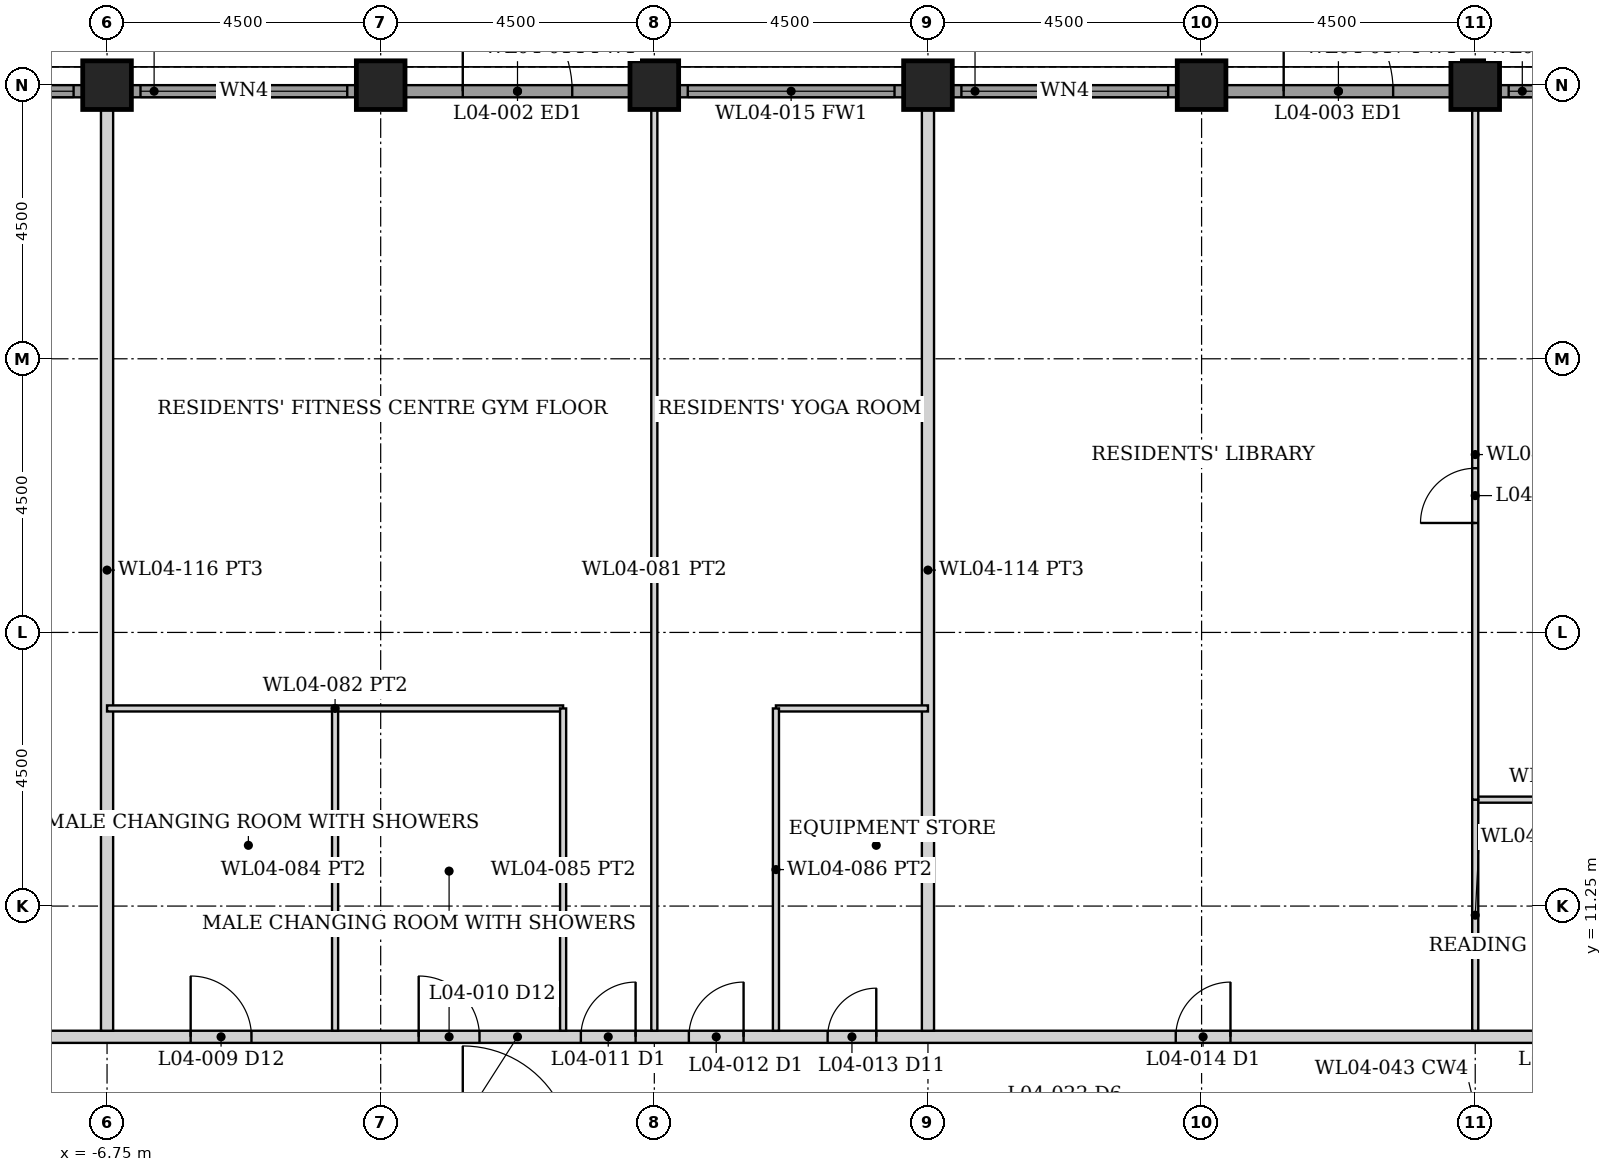
"""IFC4 building model, lengths in metres.
Left out: names, types, materials, properties, quantities, classifications, styles, units other than length and angle.
Written with IfcOpenShell. Run it as: python <this file> out.ifc"""

import sys

from ifc_helpers import new_model, si_unit, direction, frame, frame_2d, origin, origin_2d, place, context, subcontext, project, spatial, rectangle, hollow_rectangle, extrude, element, fill, save


model = new_model("IFC4")
c1 = context("Model", 3, precision=1e-05, world=origin(), true_north=direction((0.0, 1.0)))
c2 = subcontext(c1, "Body", "Model", "MODEL_VIEW")
j1 = project(units=[si_unit("LENGTHUNIT", "METRE"), si_unit("PLANEANGLEUNIT", "RADIAN")], contexts=[c1])
p1 = place(None, origin())
s1 = spatial("IfcSite", under=j1, at=p1, CompositionType="ELEMENT")
p2 = place(p1, origin())
s2 = spatial("IfcBuilding", under=s1, at=p2, CompositionType="ELEMENT")
p3 = place(p2, frame((0.0, 0.0, 21.5)))
s3 = spatial("IfcBuildingStorey", under=s2, at=p3, CompositionType="ELEMENT", Elevation=21.5)
for number, where, z_axis, x_axis in (
    (1, (-6.75, 24.75, 0.0), (0.0, 0.0, 1.0), (0.0, 1.0, 0.0)),
    (2, (-2.25, 24.75, 0.0), (0.0, 0.0, 1.0), (0.0, 1.0, 0.0)),
    (3, (2.25, 24.75, 0.0), (0.0, 0.0, 1.0), (0.0, 1.0, 0.0)),
    (4, (6.75, 24.75, 0.0), (0.0, 0.0, 1.0), (0.0, 1.0, 0.0)),
    (5, (11.25, 24.75, 0.0), (0.0, 0.0, 1.0), (0.0, 1.0, 0.0)),
    (6, (15.75, 24.75, 0.0), (0.0, 0.0, 1.0), (0.0, 1.0, 0.0)),
):
    element("IfcColumn", number, at=place(p3, frame(where, z_axis=z_axis, x_axis=x_axis)), inside=s3, PredefinedType="COLUMN", context=c2, shape_type="SweptSolid", body=[
        extrude(hollow_rectangle(XDim=0.8, YDim=0.8, WallThickness=0.08, at=origin_2d()), origin(), (0.0, 0.0, 1.0), 5.0),
    ])
p4 = place(p3, frame((-10.845, 24.65, 0.0), z_axis=(0.0, 0.0, 1.0), x_axis=(1.0, 0.0, 0.0)))
e7 = element("IfcWall", 7, at=p4, inside=s3, PredefinedType="SOLIDWALL", context=c2, shape_type="SweptSolid", body=[
    extrude(rectangle(XDim=3.69, YDim=0.2, at=frame_2d((1.845, 0.0))), origin(), (0.0, 0.0, 1.0), 3.879),
])
p5 = place(p4, frame((0.145, 0.0, 0.3)))
e8 = element("IfcOpeningElement", 8, at=p5, cuts=e7, PredefinedType="OPENING", context=c2, shape_type="SweptSolid", body=[
    extrude(rectangle(XDim=3.4, YDim=3.429, at=frame_2d((1.7, 1.714))), frame((0.0, 0.11, 0.0), z_axis=(0.0, -1.0, 0.0), x_axis=(1.0, 0.0, 0.0)), (0.0, 0.0, 1.0), 0.22),
])
p6 = place(p3, frame((-6.345, 24.65, 0.0), z_axis=(0.0, 0.0, 1.0), x_axis=(1.0, 0.0, 0.0)))
e9 = element("IfcWall", 9, at=p6, inside=s3, PredefinedType="SOLIDWALL", context=c2, shape_type="SweptSolid", body=[
    extrude(rectangle(XDim=3.69, YDim=0.2, at=frame_2d((1.845, 0.0))), origin(), (0.0, 0.0, 1.0), 3.879),
])
p7 = place(p6, frame((0.145, 0.0, 0.3)))
e10 = element("IfcOpeningElement", 10, at=p7, cuts=e9, PredefinedType="OPENING", context=c2, shape_type="SweptSolid", body=[
    extrude(rectangle(XDim=3.4, YDim=3.429, at=frame_2d((1.7, 1.714))), frame((0.0, 0.11, 0.0), z_axis=(0.0, -1.0, 0.0), x_axis=(1.0, 0.0, 0.0)), (0.0, 0.0, 1.0), 0.22),
])
p8 = place(p3, frame((-1.845, 24.65, 0.0), z_axis=(0.0, 0.0, 1.0), x_axis=(1.0, 0.0, 0.0)))
e11 = element("IfcWall", 11, at=p8, inside=s3, PredefinedType="SOLIDWALL", context=c2, shape_type="SweptSolid", body=[
    extrude(rectangle(XDim=3.69, YDim=0.2, at=frame_2d((1.845, 0.0))), origin(), (0.0, 0.0, 1.0), 3.879),
])
p9 = place(p8, frame((0.945, 0.0, 0.0)))
e12 = element("IfcOpeningElement", 12, at=p9, cuts=e11, PredefinedType="OPENING", context=c2, shape_type="SweptSolid", body=[
    extrude(rectangle(XDim=1.8, YDim=2.4, at=frame_2d((0.9, 1.2))), frame((0.0, 0.11, 0.0), z_axis=(0.0, -1.0, 0.0), x_axis=(1.0, 0.0, 0.0)), (0.0, 0.0, 1.0), 0.22),
])
p10 = place(p3, frame((2.655, 24.65, 0.0), z_axis=(0.0, 0.0, 1.0), x_axis=(1.0, 0.0, 0.0)))
e13 = element("IfcWall", 13, at=p10, inside=s3, PredefinedType="SOLIDWALL", context=c2, shape_type="SweptSolid", body=[
    extrude(rectangle(XDim=3.69, YDim=0.2, at=frame_2d((1.845, 0.0))), origin(), (0.0, 0.0, 1.0), 3.879),
])
p11 = place(p10, frame((0.145, 0.0, 0.3)))
e14 = element("IfcOpeningElement", 14, at=p11, cuts=e13, PredefinedType="OPENING", context=c2, shape_type="SweptSolid", body=[
    extrude(rectangle(XDim=3.4, YDim=3.429, at=frame_2d((1.7, 1.714))), frame((0.0, 0.11, 0.0), z_axis=(0.0, -1.0, 0.0), x_axis=(1.0, 0.0, 0.0)), (0.0, 0.0, 1.0), 0.22),
])
p12 = place(p3, frame((7.155, 24.65, 0.0), z_axis=(0.0, 0.0, 1.0), x_axis=(1.0, 0.0, 0.0)))
e15 = element("IfcWall", 15, at=p12, inside=s3, PredefinedType="SOLIDWALL", context=c2, shape_type="SweptSolid", body=[
    extrude(rectangle(XDim=3.69, YDim=0.2, at=frame_2d((1.845, 0.0))), origin(), (0.0, 0.0, 1.0), 3.879),
])
p13 = place(p12, frame((0.145, 0.0, 0.3)))
e16 = element("IfcOpeningElement", 16, at=p13, cuts=e15, PredefinedType="OPENING", context=c2, shape_type="SweptSolid", body=[
    extrude(rectangle(XDim=3.4, YDim=3.429, at=frame_2d((1.7, 1.714))), frame((0.0, 0.11, 0.0), z_axis=(0.0, -1.0, 0.0), x_axis=(1.0, 0.0, 0.0)), (0.0, 0.0, 1.0), 0.22),
])
p14 = place(p3, frame((11.655, 24.65, 0.0), z_axis=(0.0, 0.0, 1.0), x_axis=(1.0, 0.0, 0.0)))
e17 = element("IfcWall", 17, at=p14, inside=s3, PredefinedType="SOLIDWALL", context=c2, shape_type="SweptSolid", body=[
    extrude(rectangle(XDim=3.69, YDim=0.2, at=frame_2d((1.845, 0.0))), origin(), (0.0, 0.0, 1.0), 3.879),
])
p15 = place(p14, frame((0.945, 0.0, 0.0)))
e18 = element("IfcOpeningElement", 18, at=p15, cuts=e17, PredefinedType="OPENING", context=c2, shape_type="SweptSolid", body=[
    extrude(rectangle(XDim=1.8, YDim=2.4, at=frame_2d((0.9, 1.2))), frame((0.0, 0.11, 0.0), z_axis=(0.0, -1.0, 0.0), x_axis=(1.0, 0.0, 0.0)), (0.0, 0.0, 1.0), 0.22),
])
p16 = place(p3, frame((16.155, 24.65, 0.0), z_axis=(0.0, 0.0, 1.0), x_axis=(1.0, 0.0, 0.0)))
e19 = element("IfcWall", 19, at=p16, inside=s3, PredefinedType="SOLIDWALL", context=c2, shape_type="SweptSolid", body=[
    extrude(rectangle(XDim=3.69, YDim=0.2, at=frame_2d((1.845, 0.0))), origin(), (0.0, 0.0, 1.0), 3.879),
])
p17 = place(p16, frame((0.145, 0.0, 0.3)))
e20 = element("IfcOpeningElement", 20, at=p17, cuts=e19, PredefinedType="OPENING", context=c2, shape_type="SweptSolid", body=[
    extrude(rectangle(XDim=3.4, YDim=3.429, at=frame_2d((1.7, 1.714))), frame((0.0, 0.11, 0.0), z_axis=(0.0, -1.0, 0.0), x_axis=(1.0, 0.0, 0.0)), (0.0, 0.0, 1.0), 0.22),
])
p18 = place(p3, frame((-24.55, 9.1, 0.0), z_axis=(0.0, 0.0, 1.0), x_axis=(1.0, 0.0, 0.0)))
e21 = element("IfcWall", 21, at=p18, inside=s3, PredefinedType="PARTITIONING", context=c2, shape_type="SweptSolid", body=[
    extrude(rectangle(XDim=49.1, YDim=0.2, at=frame_2d((24.55, 0.0))), origin(), (0.0, 0.0, 1.0), 3.873),
])
p19 = place(p18, frame((6.684, 0.0, 0.0)))
e22 = element("IfcOpeningElement", 22, at=p19, cuts=e21, PredefinedType="OPENING", context=c2, shape_type="SweptSolid", body=[
    extrude(rectangle(XDim=0.9, YDim=2.1, at=frame_2d((0.45, 1.05))), frame((0.0, 0.11, 0.0), z_axis=(0.0, -1.0, 0.0), x_axis=(1.0, 0.0, 0.0)), (0.0, 0.0, 1.0), 0.22),
])
p20 = place(p18, frame((14.06, 0.0, 0.0)))
e23 = element("IfcOpeningElement", 23, at=p20, cuts=e21, PredefinedType="OPENING", context=c2, shape_type="SweptSolid", body=[
    extrude(rectangle(XDim=0.9, YDim=2.1, at=frame_2d((0.45, 1.05))), frame((0.0, 0.11, 0.0), z_axis=(0.0, -1.0, 0.0), x_axis=(1.0, 0.0, 0.0)), (0.0, 0.0, 1.0), 0.22),
])
p21 = place(p18, frame((9.65, 0.0, 0.0)))
e24 = element("IfcOpeningElement", 24, at=p21, cuts=e21, PredefinedType="OPENING", context=c2, shape_type="SweptSolid", body=[
    extrude(rectangle(XDim=0.8, YDim=2.1, at=frame_2d((0.4, 1.05))), frame((0.0, 0.11, 0.0), z_axis=(0.0, -1.0, 0.0), x_axis=(1.0, 0.0, 0.0)), (0.0, 0.0, 1.0), 0.22),
])
p22 = place(p18, frame((25.592, 0.0, 0.0)))
e25 = element("IfcOpeningElement", 25, at=p22, cuts=e21, PredefinedType="OPENING", context=c2, shape_type="SweptSolid", body=[
    extrude(rectangle(XDim=0.9, YDim=2.1, at=frame_2d((0.45, 1.05))), frame((0.0, 0.11, 0.0), z_axis=(0.0, -1.0, 0.0), x_axis=(1.0, 0.0, 0.0)), (0.0, 0.0, 1.0), 0.22),
])
p23 = place(p18, frame((27.368, 0.0, 0.0)))
e26 = element("IfcOpeningElement", 26, at=p23, cuts=e21, PredefinedType="OPENING", context=c2, shape_type="SweptSolid", body=[
    extrude(rectangle(XDim=0.9, YDim=2.1, at=frame_2d((0.45, 1.05))), frame((0.0, 0.11, 0.0), z_axis=(0.0, -1.0, 0.0), x_axis=(1.0, 0.0, 0.0)), (0.0, 0.0, 1.0), 0.22),
])
p24 = place(p18, frame((19.175, 0.0, 0.0)))
e27 = element("IfcOpeningElement", 27, at=p24, cuts=e21, PredefinedType="OPENING", context=c2, shape_type="SweptSolid", body=[
    extrude(rectangle(XDim=1.0, YDim=2.1, at=frame_2d((0.5, 1.05))), frame((0.0, 0.11, 0.0), z_axis=(0.0, -1.0, 0.0), x_axis=(1.0, 0.0, 0.0)), (0.0, 0.0, 1.0), 0.22),
])
p25 = place(p18, frame((22.925, 0.0, 0.0)))
e28 = element("IfcOpeningElement", 28, at=p25, cuts=e21, PredefinedType="OPENING", context=c2, shape_type="SweptSolid", body=[
    extrude(rectangle(XDim=1.0, YDim=2.1, at=frame_2d((0.5, 1.05))), frame((0.0, 0.11, 0.0), z_axis=(0.0, -1.0, 0.0), x_axis=(1.0, 0.0, 0.0)), (0.0, 0.0, 1.0), 0.22),
])
p26 = place(p18, frame((29.65, 0.0, 0.0)))
e29 = element("IfcOpeningElement", 29, at=p26, cuts=e21, PredefinedType="OPENING", context=c2, shape_type="SweptSolid", body=[
    extrude(rectangle(XDim=0.8, YDim=2.1, at=frame_2d((0.4, 1.05))), frame((0.0, 0.11, 0.0), z_axis=(0.0, -1.0, 0.0), x_axis=(1.0, 0.0, 0.0)), (0.0, 0.0, 1.0), 0.22),
])
p27 = place(p18, frame((35.375, 0.0, 0.0)))
e30 = element("IfcOpeningElement", 30, at=p27, cuts=e21, PredefinedType="OPENING", context=c2, shape_type="SweptSolid", body=[
    extrude(rectangle(XDim=0.9, YDim=2.1, at=frame_2d((0.45, 1.05))), frame((0.0, 0.11, 0.0), z_axis=(0.0, -1.0, 0.0), x_axis=(1.0, 0.0, 0.0)), (0.0, 0.0, 1.0), 0.22),
])
p28 = place(p18, frame((41.55, 0.0, 0.0)))
e31 = element("IfcOpeningElement", 31, at=p28, cuts=e21, PredefinedType="OPENING", context=c2, shape_type="SweptSolid", body=[
    extrude(rectangle(XDim=1.0, YDim=2.1, at=frame_2d((0.5, 1.05))), frame((0.0, 0.11, 0.0), z_axis=(0.0, -1.0, 0.0), x_axis=(1.0, 0.0, 0.0)), (0.0, 0.0, 1.0), 0.22),
])
for number, where, z_axis, x_axis in (
    (32, (-6.75, 9.2, 0.0), (0.0, 0.0, 1.0), (0.0, 1.0, 0.0)),
    (33, (6.75, 9.2, 0.0), (0.0, 0.0, 1.0), (0.0, 1.0, 0.0)),
):
    element("IfcWall", number, at=place(p3, frame(where, z_axis=z_axis, x_axis=x_axis)), inside=s3, PredefinedType="PARTITIONING", context=c2, shape_type="SweptSolid", body=[
        extrude(rectangle(XDim=15.15, YDim=0.2, at=frame_2d((7.575, 0.0))), origin(), (0.0, 0.0, 1.0), 3.873),
    ])
p29 = place(p3, frame((-6.75, 14.5, 0.0), z_axis=(0.0, 0.0, 1.0), x_axis=(1.0, 0.0, 0.0)))
e34 = element("IfcWall", 34, at=p29, inside=s3, PredefinedType="PARTITIONING", context=c2, shape_type="SweptSolid", body=[
    extrude(rectangle(XDim=7.5, YDim=0.1, at=frame_2d((3.75, 0.0))), origin(), (0.0, 0.0, 1.0), 3.873),
])
p30 = place(p3, frame((4.25, 14.5, 0.0), z_axis=(0.0, 0.0, 1.0), x_axis=(1.0, 0.0, 0.0)))
e35 = element("IfcWall", 35, at=p30, inside=s3, PredefinedType="PARTITIONING", context=c2, shape_type="SweptSolid", body=[
    extrude(rectangle(XDim=2.5, YDim=0.1, at=frame_2d((1.25, 0.0))), origin(), (0.0, 0.0, 1.0), 3.873),
])
for number, where, z_axis, x_axis in (
    (36, (-3.0, 9.2, 0.0), (0.0, 0.0, 1.0), (0.0, 1.0, 0.0)),
    (37, (0.75, 9.2, 0.0), (0.0, 0.0, 1.0), (0.0, 1.0, 0.0)),
    (38, (4.25, 9.2, 0.0), (0.0, 0.0, 1.0), (0.0, 1.0, 0.0)),
):
    element("IfcWall", number, at=place(p3, frame(where, z_axis=z_axis, x_axis=x_axis)), inside=s3, PredefinedType="PARTITIONING", context=c2, shape_type="SweptSolid", body=[
        extrude(rectangle(XDim=5.3, YDim=0.1, at=frame_2d((2.65, 0.0))), origin(), (0.0, 0.0, 1.0), 3.873),
    ])
p31 = place(p3, frame((2.25, 9.2, 0.0), z_axis=(0.0, 0.0, 1.0), x_axis=(0.0, 1.0, 0.0)))
e39 = element("IfcWall", 39, at=p31, inside=s3, PredefinedType="PARTITIONING", context=c2, shape_type="SweptSolid", body=[
    extrude(rectangle(XDim=15.15, YDim=0.1, at=frame_2d((7.575, 0.0))), origin(), (0.0, 0.0, 1.0), 3.873),
])
p32 = place(p3, frame((15.75, 13.0, 0.0), z_axis=(0.0, 0.0, 1.0), x_axis=(1.0, 0.0, 0.0)))
e40 = element("IfcWall", 40, at=p32, inside=s3, PredefinedType="PARTITIONING", context=c2, shape_type="SweptSolid", body=[
    extrude(rectangle(XDim=3.5, YDim=0.1, at=frame_2d((1.75, 0.0))), origin(), (0.0, 0.0, 1.0), 3.873),
])
p33 = place(p3, frame((15.75, 9.2, 0.0), z_axis=(0.0, 0.0, 1.0), x_axis=(0.0, 1.0, 0.0)))
e41 = element("IfcWall", 41, at=p33, inside=s3, PredefinedType="PARTITIONING", context=c2, shape_type="SweptSolid", body=[
    extrude(rectangle(XDim=3.8, YDim=0.1, at=frame_2d((1.9, 0.0))), origin(), (0.0, 0.0, 1.0), 3.873),
])
p34 = place(p3, frame((15.75, 13.0, 0.0), z_axis=(0.0, 0.0, 1.0), x_axis=(0.0, 1.0, 0.0)))
e42 = element("IfcWall", 42, at=p34, inside=s3, PredefinedType="PARTITIONING", context=c2, shape_type="SweptSolid", body=[
    extrude(rectangle(XDim=11.35, YDim=0.1, at=frame_2d((5.675, 0.0))), origin(), (0.0, 0.0, 1.0), 3.873),
])
p35 = place(p34, frame((4.55, 0.0, 0.0)))
e43 = element("IfcOpeningElement", 43, at=p35, cuts=e42, PredefinedType="OPENING", context=c2, shape_type="SweptSolid", body=[
    extrude(rectangle(XDim=0.9, YDim=2.1, at=frame_2d((0.45, 1.05))), frame((0.0, 0.06, 0.0), z_axis=(0.0, -1.0, 0.0), x_axis=(1.0, 0.0, 0.0)), (0.0, 0.0, 1.0), 0.12),
])
p36 = place(p5, origin())
e44 = element("IfcWindow", 44, at=p36, inside=s3, PartitioningType="SINGLE_PANEL", PredefinedType="WINDOW", context=c2, shape_type="SweptSolid", body=[
    extrude(rectangle(XDim=3.4, YDim=3.429, at=frame_2d((1.7, 1.714))), frame((0.0, 0.03, 0.0), z_axis=(0.0, -1.0, 0.0), x_axis=(1.0, 0.0, 0.0)), (0.0, 0.0, 1.0), 0.06),
])
fill(e8, e44)
p37 = place(p7, origin())
e45 = element("IfcWindow", 45, at=p37, inside=s3, PartitioningType="SINGLE_PANEL", PredefinedType="WINDOW", context=c2, shape_type="SweptSolid", body=[
    extrude(rectangle(XDim=3.4, YDim=3.429, at=frame_2d((1.7, 1.714))), frame((0.0, 0.03, 0.0), z_axis=(0.0, -1.0, 0.0), x_axis=(1.0, 0.0, 0.0)), (0.0, 0.0, 1.0), 0.06),
])
fill(e10, e45)
p38 = place(p9, origin())
e46 = element("IfcDoor", 46, at=p38, inside=s3, OperationType="DOUBLE_DOOR_SINGLE_SWING", PredefinedType="DOOR", context=c2, shape_type="SweptSolid", body=[
    extrude(rectangle(XDim=1.8, YDim=2.4, at=frame_2d((0.9, 1.2))), frame((0.0, 0.025, 0.0), z_axis=(0.0, -1.0, 0.0), x_axis=(1.0, 0.0, 0.0)), (0.0, 0.0, 1.0), 0.05),
])
fill(e12, e46)
p39 = place(p11, origin())
e47 = element("IfcWindow", 47, at=p39, inside=s3, PartitioningType="SINGLE_PANEL", PredefinedType="WINDOW", context=c2, shape_type="SweptSolid", body=[
    extrude(rectangle(XDim=3.4, YDim=3.429, at=frame_2d((1.7, 1.714))), frame((0.0, 0.03, 0.0), z_axis=(0.0, -1.0, 0.0), x_axis=(1.0, 0.0, 0.0)), (0.0, 0.0, 1.0), 0.06),
])
fill(e14, e47)
p40 = place(p13, origin())
e48 = element("IfcWindow", 48, at=p40, inside=s3, PartitioningType="SINGLE_PANEL", PredefinedType="WINDOW", context=c2, shape_type="SweptSolid", body=[
    extrude(rectangle(XDim=3.4, YDim=3.429, at=frame_2d((1.7, 1.714))), frame((0.0, 0.03, 0.0), z_axis=(0.0, -1.0, 0.0), x_axis=(1.0, 0.0, 0.0)), (0.0, 0.0, 1.0), 0.06),
])
fill(e16, e48)
p41 = place(p15, origin())
e49 = element("IfcDoor", 49, at=p41, inside=s3, OperationType="DOUBLE_DOOR_SINGLE_SWING", PredefinedType="DOOR", context=c2, shape_type="SweptSolid", body=[
    extrude(rectangle(XDim=1.8, YDim=2.4, at=frame_2d((0.9, 1.2))), frame((0.0, 0.025, 0.0), z_axis=(0.0, -1.0, 0.0), x_axis=(1.0, 0.0, 0.0)), (0.0, 0.0, 1.0), 0.05),
])
fill(e18, e49)
p42 = place(p17, origin())
e50 = element("IfcWindow", 50, at=p42, inside=s3, PartitioningType="SINGLE_PANEL", PredefinedType="WINDOW", context=c2, shape_type="SweptSolid", body=[
    extrude(rectangle(XDim=3.4, YDim=3.429, at=frame_2d((1.7, 1.714))), frame((0.0, 0.03, 0.0), z_axis=(0.0, -1.0, 0.0), x_axis=(1.0, 0.0, 0.0)), (0.0, 0.0, 1.0), 0.06),
])
fill(e20, e50)
p43 = place(p22, origin())
e51 = element("IfcDoor", 51, at=p43, inside=s3, OperationType="SINGLE_SWING_RIGHT", PredefinedType="DOOR", context=c2, shape_type="SweptSolid", body=[
    extrude(rectangle(XDim=0.9, YDim=2.1, at=frame_2d((0.45, 1.05))), frame((0.0, 0.025, 0.0), z_axis=(0.0, -1.0, 0.0), x_axis=(1.0, 0.0, 0.0)), (0.0, 0.0, 1.0), 0.05),
])
fill(e25, e51)
p44 = place(p23, origin())
e52 = element("IfcDoor", 52, at=p44, inside=s3, OperationType="SINGLE_SWING_RIGHT", PredefinedType="DOOR", context=c2, shape_type="SweptSolid", body=[
    extrude(rectangle(XDim=0.9, YDim=2.1, at=frame_2d((0.45, 1.05))), frame((0.0, 0.025, 0.0), z_axis=(0.0, -1.0, 0.0), x_axis=(1.0, 0.0, 0.0)), (0.0, 0.0, 1.0), 0.05),
])
fill(e26, e52)
p45 = place(p24, origin())
e53 = element("IfcDoor", 53, at=p45, inside=s3, OperationType="SINGLE_SWING_LEFT", PredefinedType="DOOR", context=c2, shape_type="SweptSolid", body=[
    extrude(rectangle(XDim=1.0, YDim=2.1, at=frame_2d((0.5, 1.05))), frame((0.0, 0.025, 0.0), z_axis=(0.0, -1.0, 0.0), x_axis=(1.0, 0.0, 0.0)), (0.0, 0.0, 1.0), 0.05),
])
fill(e27, e53)
p46 = place(p25, origin())
e54 = element("IfcDoor", 54, at=p46, inside=s3, OperationType="SINGLE_SWING_LEFT", PredefinedType="DOOR", context=c2, shape_type="SweptSolid", body=[
    extrude(rectangle(XDim=1.0, YDim=2.1, at=frame_2d((0.5, 1.05))), frame((0.0, 0.025, 0.0), z_axis=(0.0, -1.0, 0.0), x_axis=(1.0, 0.0, 0.0)), (0.0, 0.0, 1.0), 0.05),
])
fill(e28, e54)
p47 = place(p26, origin())
e55 = element("IfcDoor", 55, at=p47, inside=s3, OperationType="SINGLE_SWING_RIGHT", PredefinedType="DOOR", context=c2, shape_type="SweptSolid", body=[
    extrude(rectangle(XDim=0.8, YDim=2.1, at=frame_2d((0.4, 1.05))), frame((0.0, 0.025, 0.0), z_axis=(0.0, -1.0, 0.0), x_axis=(1.0, 0.0, 0.0)), (0.0, 0.0, 1.0), 0.05),
])
fill(e29, e55)
p48 = place(p27, origin())
e56 = element("IfcDoor", 56, at=p48, inside=s3, OperationType="SINGLE_SWING_RIGHT", PredefinedType="DOOR", context=c2, shape_type="SweptSolid", body=[
    extrude(rectangle(XDim=0.9, YDim=2.1, at=frame_2d((0.45, 1.05))), frame((0.0, 0.025, 0.0), z_axis=(0.0, -1.0, 0.0), x_axis=(1.0, 0.0, 0.0)), (0.0, 0.0, 1.0), 0.05),
])
fill(e30, e56)
p49 = place(p35, origin())
e57 = element("IfcDoor", 57, at=p49, inside=s3, OperationType="SINGLE_SWING_LEFT", PredefinedType="DOOR", context=c2, shape_type="SweptSolid", body=[
    extrude(rectangle(XDim=0.9, YDim=2.1, at=frame_2d((0.45, 1.05))), frame((0.0, 0.025, 0.0), z_axis=(0.0, -1.0, 0.0), x_axis=(1.0, 0.0, 0.0)), (0.0, 0.0, 1.0), 0.05),
])
fill(e43, e57)
save(model, sys.argv[1])
